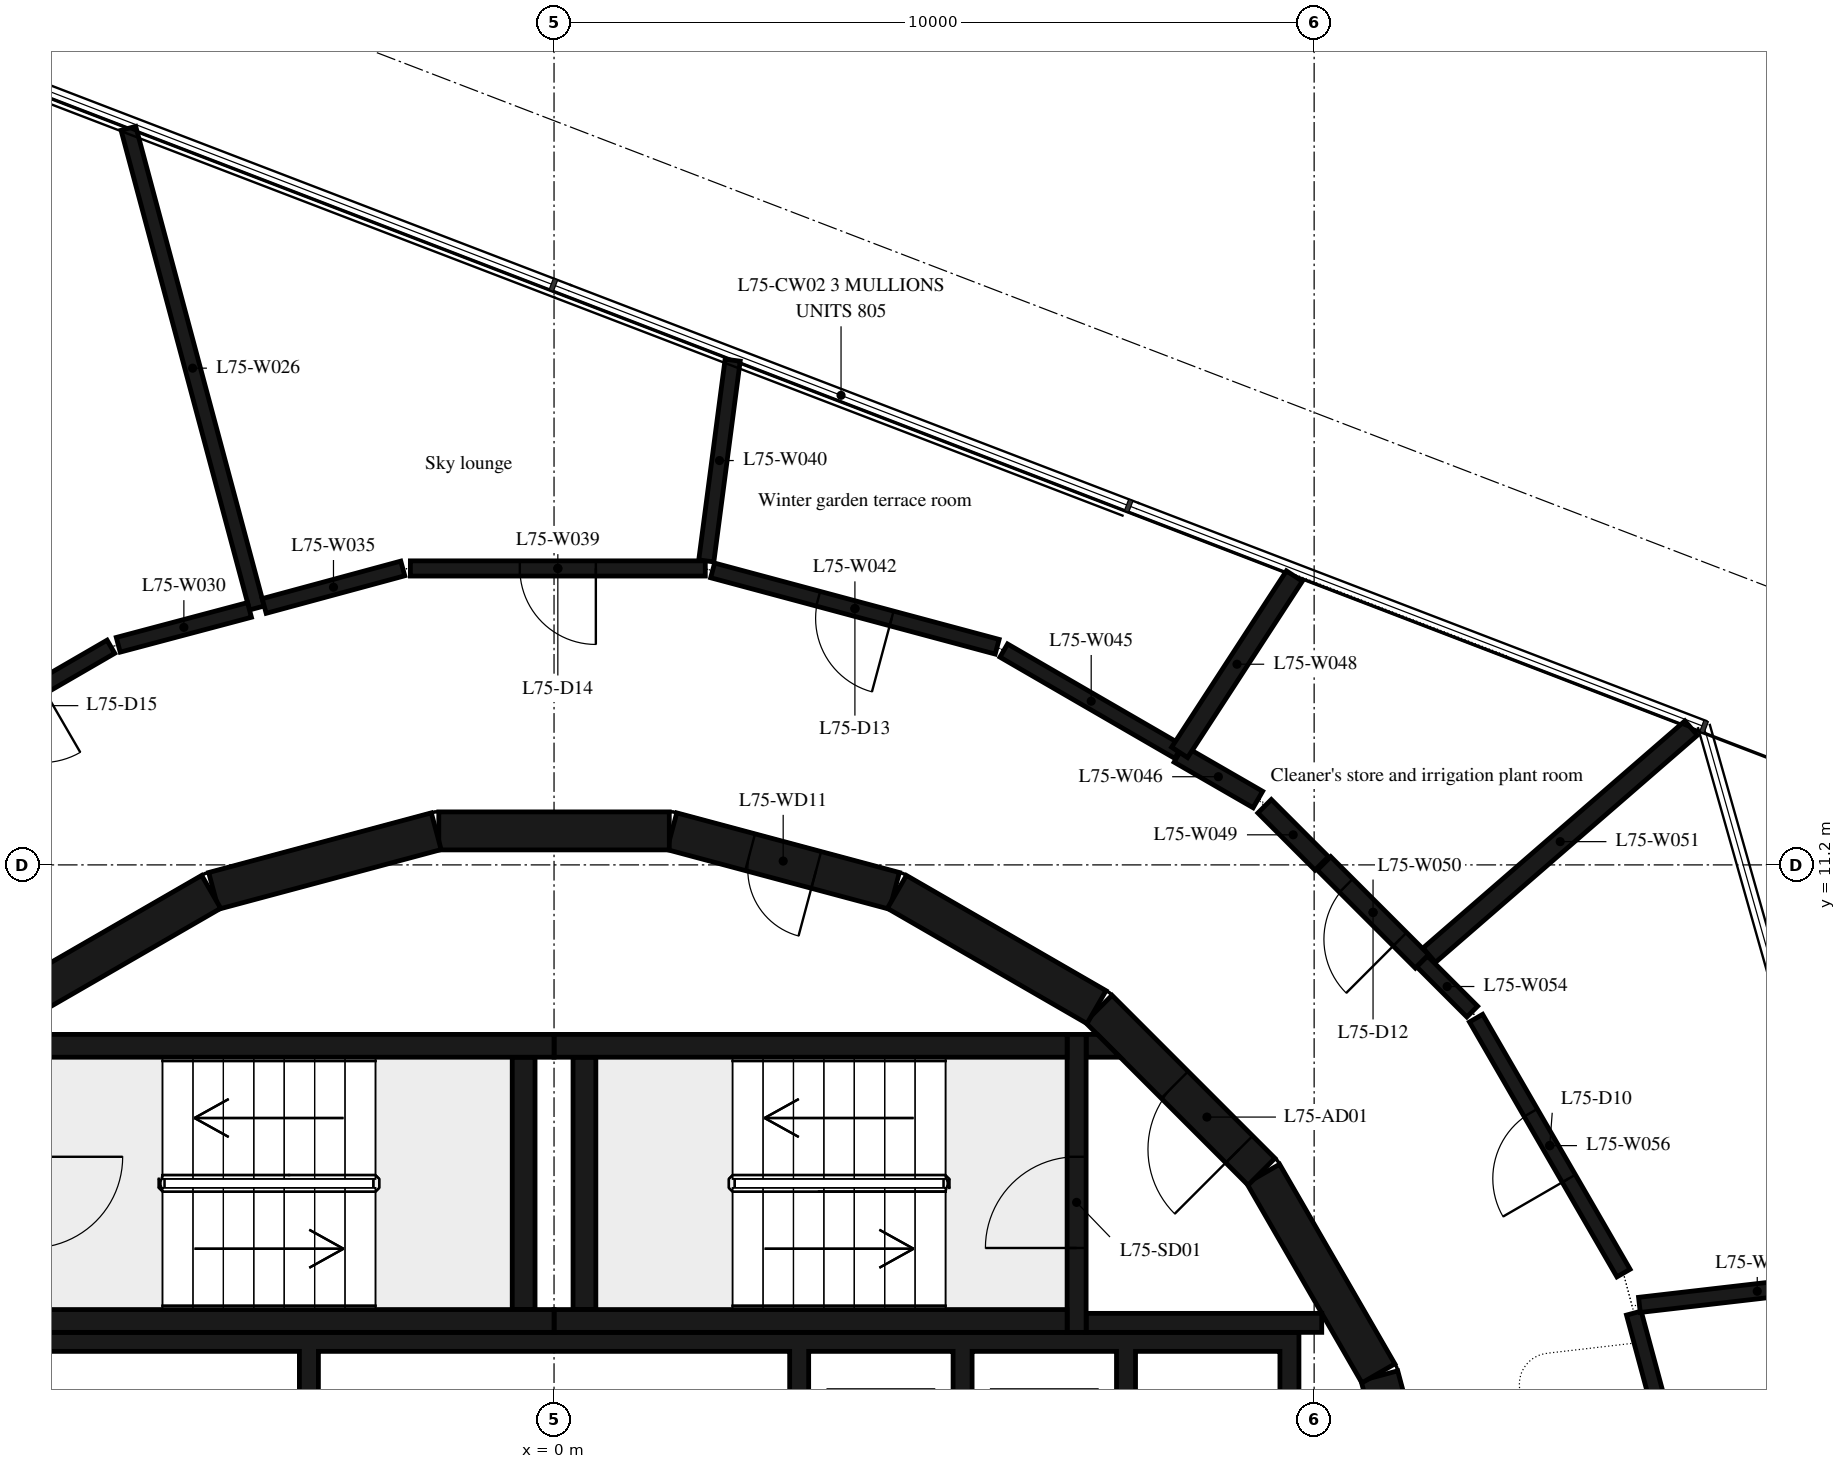
"""IFC4 building model, lengths in metres.
Left out: names, types, materials, properties, quantities, classifications, styles, units other than length and angle.
Written with IfcOpenShell. Run it as: python <this file> out.ifc"""

import sys

from ifc_helpers import new_model, si_unit, direction, frame, frame_2d, origin, place, context, subcontext, project, spatial, polyline, rectangle, outline, extrude, element, fill, save


model = new_model("IFC4")
c1 = context("Model", 3, precision=1e-05, world=origin(), true_north=direction((0.0, 1.0)))
c2 = subcontext(c1, "Body", "Model", "MODEL_VIEW")
j1 = project(units=[si_unit("LENGTHUNIT", "METRE"), si_unit("PLANEANGLEUNIT", "RADIAN")], contexts=[c1])
p1 = place(None, origin())
s1 = spatial("IfcSite", under=j1, at=p1, CompositionType="ELEMENT")
p2 = place(p1, origin())
s2 = spatial("IfcBuilding", under=s1, at=p2, CompositionType="ELEMENT")
p3 = place(p2, frame((0.0, 0.0, 291.4)))
s3 = spatial("IfcBuildingStorey", under=s2, at=p3, CompositionType="ELEMENT", Elevation=291.4)
for number, where, z_axis, x_axis in (
    (1, (11.643, 1.55, 0.0), (0.0, 0.0, 1.0), (-0.259, 0.966, 0.0)),
    (2, (10.845, 4.51, 0.0), (0.0, 0.0, 1.0), (-0.5, 0.866, 0.0)),
):
    element("IfcWall", number, at=place(p3, frame(where, z_axis=z_axis, x_axis=x_axis)), inside=s3, PredefinedType="SHEAR", context=c2, shape_type="SweptSolid", body=[
        extrude(rectangle(XDim=3.033, YDim=0.5, at=frame_2d((1.516, 0.0))), origin(), (0.0, 0.0, 1.0), 6.35),
    ])
p4 = place(p3, frame((9.308, 7.164, 0.0), z_axis=(0.0, 0.0, 1.0), x_axis=(-0.707106781187, 0.707106781187, 0.0)))
e3 = element("IfcWall", 3, at=p4, inside=s3, PredefinedType="SHEAR", context=c2, shape_type="SweptSolid", body=[
    extrude(rectangle(XDim=3.032, YDim=0.5, at=frame_2d((1.516, 0.0))), origin(), (0.0, 0.0, 1.0), 6.35),
])
p5 = place(p4, frame((0.416, 0.0, 0.0)))
e4 = element("IfcOpeningElement", 4, at=p5, cuts=e3, PredefinedType="OPENING", context=c2, shape_type="SweptSolid", body=[
    extrude(rectangle(XDim=1.2, YDim=2.1, at=frame_2d((0.6, 1.05))), frame((0.0, 0.26, 0.0), z_axis=(0.0, -1.0, 0.0), x_axis=(1.0, 0.0, 0.0)), (0.0, 0.0, 1.0), 0.52),
])
p6 = place(p3, frame((7.137, 9.329, 0.0), z_axis=(0.0, 0.0, 1.0), x_axis=(-0.865975092491, 0.500087131594, 0.0)))
e5 = element("IfcWall", 5, at=p6, inside=s3, PredefinedType="SHEAR", context=c2, shape_type="SweptSolid", body=[
    extrude(rectangle(XDim=3.033, YDim=0.5, at=frame_2d((1.516, 0.0))), origin(), (0.0, 0.0, 1.0), 6.35),
])
p7 = place(p3, frame((4.479, 10.858, 0.0), z_axis=(0.0, 0.0, 1.0), x_axis=(-0.965948410781, 0.258734743916, 0.0)))
e6 = element("IfcWall", 6, at=p7, inside=s3, PredefinedType="SHEAR", context=c2, shape_type="SweptSolid", body=[
    extrude(rectangle(XDim=3.033, YDim=0.5, at=frame_2d((1.516, 0.0))), origin(), (0.0, 0.0, 1.0), 6.35),
])
p8 = place(p7, frame((1.066, 0.0, 0.0)))
e7 = element("IfcOpeningElement", 7, at=p8, cuts=e6, PredefinedType="OPENING", context=c2, shape_type="SweptSolid", body=[
    extrude(rectangle(XDim=0.9, YDim=2.1, at=frame_2d((0.45, 1.05))), frame((0.0, 0.26, 0.0), z_axis=(0.0, -1.0, 0.0), x_axis=(1.0, 0.0, 0.0)), (0.0, 0.0, 1.0), 0.52),
])
for number, where, z_axis, x_axis in (
    (8, (1.516, 11.647, 0.0), (0.0, 0.0, 1.0), (-1.0, 0.0, 0.0)),
    (9, (-1.55, 11.643, 0.0), (0.0, 0.0, 1.0), (-0.966, -0.259, 0.0)),
    (10, (-4.51, 10.845, 0.0), (0.0, 0.0, 1.0), (-0.866, -0.5, 0.0)),
):
    element("IfcWall", number, at=place(p3, frame(where, z_axis=z_axis, x_axis=x_axis)), inside=s3, PredefinedType="SHEAR", context=c2, shape_type="SweptSolid", body=[
        extrude(rectangle(XDim=3.033, YDim=0.5, at=frame_2d((1.516, 0.0))), origin(), (0.0, 0.0, 1.0), 6.35),
    ])
for number, where, z_axis, x_axis in (
    (11, (0.0, 5.2, 0.0), (0.0, 0.0, 1.0), (1.0, 0.0, 0.0)),
    (12, (0.0, 8.82, 0.0), (0.0, 0.0, 1.0), (1.0, 0.0, 0.0)),
):
    element("IfcWall", number, at=place(p3, frame(where, z_axis=z_axis, x_axis=x_axis)), inside=s3, PredefinedType="SHEAR", context=c2, shape_type="SweptSolid", body=[
        extrude(rectangle(XDim=6.75, YDim=0.3, at=frame_2d((3.375, 0.0))), origin(), (0.0, 0.0, 1.0), 6.35),
    ])
p9 = place(p3, frame((0.4, 5.35, 0.0), z_axis=(0.0, 0.0, 1.0), x_axis=(0.0, 1.0, 0.0)))
e13 = element("IfcWall", 13, at=p9, inside=s3, PredefinedType="SHEAR", context=c2, shape_type="SweptSolid", body=[
    extrude(rectangle(XDim=3.32, YDim=0.3, at=frame_2d((1.66, 0.0))), origin(), (0.0, 0.0, 1.0), 6.35),
])
p10 = place(p3, frame((6.875, 5.05, 0.0), z_axis=(0.0, 0.0, 1.0), x_axis=(0.0, 1.0, 0.0)))
e14 = element("IfcWall", 14, at=p10, inside=s3, PredefinedType="SHEAR", context=c2, shape_type="SweptSolid", body=[
    extrude(rectangle(XDim=3.92, YDim=0.25, at=frame_2d((1.96, 0.0))), origin(), (0.0, 0.0, 1.0), 6.35),
])
p11 = place(p10, frame((1.11, 0.0, 0.0)))
e15 = element("IfcOpeningElement", 15, at=p11, cuts=e14, PredefinedType="OPENING", context=c2, shape_type="SweptSolid", body=[
    extrude(rectangle(XDim=1.2, YDim=2.1, at=frame_2d((0.6, 1.05))), frame((0.0, 0.135, 0.0), z_axis=(0.0, -1.0, 0.0), x_axis=(1.0, 0.0, 0.0)), (0.0, 0.0, 1.0), 0.27),
])
p12 = place(p3, frame((7.0, 5.175, 0.0), z_axis=(0.0, 0.0, 1.0), x_axis=(1.0, 0.0, 0.0)))
e16 = element("IfcWall", 16, at=p12, inside=s3, PredefinedType="SHEAR", context=c2, shape_type="SweptSolid", body=[
    extrude(rectangle(XDim=3.1, YDim=0.25, at=frame_2d((1.55, 0.0))), origin(), (0.0, 0.0, 1.0), 6.35),
])
p13 = place(p3, origin())
e17 = element("IfcWall", 17, at=p13, inside=s3, PredefinedType="SHEAR", context=c2, shape_type="SweptSolid", body=[
    extrude(outline(polyline([(7.448, 8.67), (7.0, 8.67), (7.0, 8.97), (7.148, 8.97), (7.448, 8.67)])), origin(), (0.0, 0.0, 1.0), 6.35),
])
for number, where, z_axis, x_axis in (
    (18, (-6.75, 5.2, 0.0), (0.0, 0.0, 1.0), (1.0, 0.0, 0.0)),
    (19, (-6.75, 8.82, 0.0), (0.0, 0.0, 1.0), (1.0, 0.0, 0.0)),
):
    element("IfcWall", number, at=place(p3, frame(where, z_axis=z_axis, x_axis=x_axis)), inside=s3, PredefinedType="SHEAR", context=c2, shape_type="SweptSolid", body=[
        extrude(rectangle(XDim=6.75, YDim=0.3, at=frame_2d((3.375, 0.0))), origin(), (0.0, 0.0, 1.0), 6.35),
    ])
p14 = place(p3, frame((-0.4, 5.35, 0.0), z_axis=(0.0, 0.0, 1.0), x_axis=(0.0, 1.0, 0.0)))
e20 = element("IfcWall", 20, at=p14, inside=s3, PredefinedType="SHEAR", context=c2, shape_type="SweptSolid", body=[
    extrude(rectangle(XDim=3.32, YDim=0.3, at=frame_2d((1.66, 0.0))), origin(), (0.0, 0.0, 1.0), 6.35),
])
p15 = place(p3, origin())
e21 = element("IfcWall", 21, at=p15, inside=s3, PredefinedType="SHEAR", context=c2, shape_type="SweptSolid", body=[
    extrude(outline(polyline([(-9.8, 1.9), (-9.55, 1.9), (-9.55, 4.8), (-3.35, 4.8), (-3.35, 1.9), (-3.1, 1.9), (-3.1, 4.8), (3.1, 4.8), (3.1, 1.9), (3.35, 1.9), (3.35, 4.8), (5.25, 4.8), (5.25, 1.9), (5.5, 1.9), (5.5, 4.8), (7.4, 4.8), (7.4, 1.9), (7.65, 1.9), (7.65, 4.8), (9.55, 4.8), (9.55, 1.9), (9.8, 1.9), (9.8, 4.8), (9.8, 5.05), (-9.8, 5.05), (-9.8, 4.8), (-9.8, 1.9)])), origin(), (0.0, 0.0, 1.0), 6.35),
])
p16 = place(p3, frame((-5.83, 14.07, 0.0), z_axis=(0.0, 0.0, 1.0), x_axis=(-0.865134039498, -0.501540719884, 0.0)))
e22 = element("IfcWall", 22, at=p16, inside=s3, PredefinedType="PARTITIONING", context=c2, shape_type="SweptSolid", body=[
    extrude(rectangle(XDim=3.09, YDim=0.2, at=frame_2d((1.545, 0.0))), origin(), (0.0, 0.0, 1.0), 6.35),
])
p17 = place(p16, frame((1.045, 0.0, 0.0)))
e23 = element("IfcOpeningElement", 23, at=p17, cuts=e22, PredefinedType="OPENING", context=c2, shape_type="SweptSolid", body=[
    extrude(rectangle(XDim=1.0, YDim=2.1, at=frame_2d((0.5, 1.05))), frame((0.0, 0.11, 0.0), z_axis=(0.0, -1.0, 0.0), x_axis=(1.0, 0.0, 0.0)), (0.0, 0.0, 1.0), 0.22),
])
p18 = place(p3, frame((-5.6, 20.89, 0.0), z_axis=(0.0, 0.0, 1.0), x_axis=(0.25874418063, -0.965945883055, 0.0)))
e24 = element("IfcWall", 24, at=p18, inside=s3, PredefinedType="PARTITIONING", context=c2, shape_type="SweptSolid", body=[
    extrude(rectangle(XDim=6.532, YDim=0.2, at=frame_2d((3.266, 0.0))), origin(), (0.0, 0.0, 1.0), 6.35),
])
p19 = place(p3, frame((-4.007, 14.554, 0.0), z_axis=(0.0, 0.0, 1.0), x_axis=(-0.966477180281, -0.256752526756, 0.0)))
e25 = element("IfcWall", 25, at=p19, inside=s3, PredefinedType="PARTITIONING", context=c2, shape_type="SweptSolid", body=[
    extrude(rectangle(XDim=1.787, YDim=0.2, at=frame_2d((0.893, 0.0))), origin(), (0.0, 0.0, 1.0), 6.35),
])
p20 = place(p3, frame((-1.99, 15.1, 0.0), z_axis=(0.0, 0.0, 1.0), x_axis=(-0.965221616417, -0.261433033875, 0.0)))
e26 = element("IfcWall", 26, at=p20, inside=s3, PredefinedType="PARTITIONING", context=c2, shape_type="SweptSolid", body=[
    extrude(rectangle(XDim=1.889, YDim=0.2, at=frame_2d((0.945, 0.0))), origin(), (0.0, 0.0, 1.0), 6.35),
])
p21 = place(p3, frame((1.99, 15.1, 0.0), z_axis=(0.0, 0.0, 1.0), x_axis=(-1.0, 0.0, 0.0)))
e27 = element("IfcWall", 27, at=p21, inside=s3, PredefinedType="PARTITIONING", context=c2, shape_type="SweptSolid", body=[
    extrude(rectangle(XDim=3.88, YDim=0.2, at=frame_2d((1.94, 0.0))), origin(), (0.0, 0.0, 1.0), 6.35),
])
p22 = place(p21, frame((1.44, 0.0, 0.0)))
e28 = element("IfcOpeningElement", 28, at=p22, cuts=e27, PredefinedType="OPENING", context=c2, shape_type="SweptSolid", body=[
    extrude(rectangle(XDim=1.0, YDim=2.1, at=frame_2d((0.5, 1.05))), frame((0.0, 0.11, 0.0), z_axis=(0.0, -1.0, 0.0), x_axis=(1.0, 0.0, 0.0)), (0.0, 0.0, 1.0), 0.22),
])
p23 = place(p3, frame((2.003, 15.199, 0.0), z_axis=(0.0, 0.0, 1.0), x_axis=(0.130338331924, 0.991469575545, 0.0)))
e29 = element("IfcWall", 29, at=p23, inside=s3, PredefinedType="PARTITIONING", context=c2, shape_type="SweptSolid", body=[
    extrude(rectangle(XDim=2.664, YDim=0.2, at=frame_2d((1.332, 0.0))), origin(), (0.0, 0.0, 1.0), 6.35),
])
p24 = place(p3, frame((5.83, 14.07, 0.0), z_axis=(0.0, 0.0, 1.0), x_axis=(-0.965870133458, 0.259026804199, 0.0)))
e30 = element("IfcWall", 30, at=p24, inside=s3, PredefinedType="PARTITIONING", context=c2, shape_type="SweptSolid", body=[
    extrude(rectangle(XDim=3.876, YDim=0.2, at=frame_2d((1.938, 0.0))), origin(), (0.0, 0.0, 1.0), 6.35),
])
p25 = place(p24, frame((1.438, 0.0, 0.0)))
e31 = element("IfcOpeningElement", 31, at=p25, cuts=e30, PredefinedType="OPENING", context=c2, shape_type="SweptSolid", body=[
    extrude(rectangle(XDim=1.0, YDim=2.1, at=frame_2d((0.5, 1.05))), frame((0.0, 0.11, 0.0), z_axis=(0.0, -1.0, 0.0), x_axis=(1.0, 0.0, 0.0)), (0.0, 0.0, 1.0), 0.22),
])
p26 = place(p3, frame((8.217, 12.687, 0.0), z_axis=(0.0, 0.0, 1.0), x_axis=(-0.865346643201, 0.501173809273, 0.0)))
e32 = element("IfcWall", 32, at=p26, inside=s3, PredefinedType="PARTITIONING", context=c2, shape_type="SweptSolid", body=[
    extrude(rectangle(XDim=2.659, YDim=0.2, at=frame_2d((1.329, 0.0))), origin(), (0.0, 0.0, 1.0), 6.35),
])
p27 = place(p3, frame((9.26, 12.06, 0.0), z_axis=(0.0, 0.0, 1.0), x_axis=(-0.866246515178, 0.499616828121, 0.0)))
e33 = element("IfcWall", 33, at=p27, inside=s3, PredefinedType="PARTITIONING", context=c2, shape_type="SweptSolid", body=[
    extrude(rectangle(XDim=1.201, YDim=0.25, at=frame_2d((0.6, 0.0))), origin(), (0.0, 0.0, 1.0), 6.35),
])
p28 = place(p3, frame((9.74, 15.0, 0.0), z_axis=(0.0, 0.0, 1.0), x_axis=(-0.545487355209, -0.838119051989, 0.0)))
e34 = element("IfcWall", 34, at=p28, inside=s3, PredefinedType="PARTITIONING", context=c2, shape_type="SweptSolid", body=[
    extrude(rectangle(XDim=2.768, YDim=0.25, at=frame_2d((1.384, 0.0))), origin(), (0.0, 0.0, 1.0), 6.35),
])
p29 = place(p3, frame((10.1, 11.22, 0.0), z_axis=(0.0, 0.0, 1.0), x_axis=(-0.707106781187, 0.707106781187, 0.0)))
e35 = element("IfcWall", 35, at=p29, inside=s3, PredefinedType="PARTITIONING", context=c2, shape_type="SweptSolid", body=[
    extrude(rectangle(XDim=1.063, YDim=0.25, at=frame_2d((0.531, 0.0))), origin(), (0.0, 0.0, 1.0), 6.35),
])
p30 = place(p3, frame((11.42, 9.93, 0.0), z_axis=(0.0, 0.0, 1.0), x_axis=(-0.707106781187, 0.707106781187, 0.0)))
e36 = element("IfcWall", 36, at=p30, inside=s3, PredefinedType="PARTITIONING", context=c2, shape_type="SweptSolid", body=[
    extrude(rectangle(XDim=1.824, YDim=0.25, at=frame_2d((0.912, 0.0))), origin(), (0.0, 0.0, 1.0), 6.35),
])
p31 = place(p30, frame((0.412, 0.0, 0.0)))
e37 = element("IfcOpeningElement", 37, at=p31, cuts=e36, PredefinedType="OPENING", context=c2, shape_type="SweptSolid", body=[
    extrude(rectangle(XDim=1.0, YDim=2.1, at=frame_2d((0.5, 1.05))), frame((0.0, 0.135, 0.0), z_axis=(0.0, -1.0, 0.0), x_axis=(1.0, 0.0, 0.0)), (0.0, 0.0, 1.0), 0.27),
])
p32 = place(p3, frame((11.514, 10.012, 0.0), z_axis=(0.0, 0.0, 1.0), x_axis=(0.755484160351, 0.655166912671, 0.0)))
e38 = element("IfcWall", 38, at=p32, inside=s3, PredefinedType="PARTITIONING", context=c2, shape_type="SweptSolid", body=[
    extrude(rectangle(XDim=4.561, YDim=0.25, at=frame_2d((2.28, 0.0))), origin(), (0.0, 0.0, 1.0), 6.35),
])
p33 = place(p3, frame((12.08, 9.27, 0.0), z_axis=(0.0, 0.0, 1.0), x_axis=(-0.707237545267, 0.70697599292, 0.0)))
e39 = element("IfcWall", 39, at=p33, inside=s3, PredefinedType="PARTITIONING", context=c2, shape_type="SweptSolid", body=[
    extrude(rectangle(XDim=0.933, YDim=0.2, at=frame_2d((0.467, 0.0))), origin(), (0.0, 0.0, 1.0), 6.35),
])
p34 = place(p3, frame((14.07, 5.83, 0.0), z_axis=(0.0, 0.0, 1.0), x_axis=(-0.500760497952, 0.865585884642, 0.0)))
e40 = element("IfcWall", 40, at=p34, inside=s3, PredefinedType="PARTITIONING", context=c2, shape_type="SweptSolid", body=[
    extrude(rectangle(XDim=3.874, YDim=0.2, at=frame_2d((1.937, 0.0))), origin(), (0.0, 0.0, 1.0), 6.35),
])
p35 = place(p34, frame((1.437, 0.0, 0.0)))
e41 = element("IfcOpeningElement", 41, at=p35, cuts=e40, PredefinedType="OPENING", context=c2, shape_type="SweptSolid", body=[
    extrude(rectangle(XDim=1.0, YDim=2.1, at=frame_2d((0.5, 1.05))), frame((0.0, 0.11, 0.0), z_axis=(0.0, -1.0, 0.0), x_axis=(1.0, 0.0, 0.0)), (0.0, 0.0, 1.0), 0.22),
])
p36 = place(p3, frame((15.1, 1.99, 0.0), z_axis=(0.0, 0.0, 1.0), x_axis=(-0.260504067916, 0.965472749796, 0.0)))
e42 = element("IfcWall", 42, at=p36, inside=s3, PredefinedType="PARTITIONING", context=c2, shape_type="SweptSolid", body=[
    extrude(rectangle(XDim=3.432, YDim=0.2, at=frame_2d((1.716, 0.0))), origin(), (0.0, 0.0, 1.0), 6.35),
])
p37 = place(p3, frame((17.38, 5.77, 0.0), z_axis=(0.0, 0.0, 1.0), x_axis=(-0.993376695714, -0.114903178426, 0.0)))
e43 = element("IfcWall", 43, at=p37, inside=s3, PredefinedType="PARTITIONING", context=c2, shape_type="SweptSolid", body=[
    extrude(rectangle(XDim=3.121, YDim=0.2, at=frame_2d((1.561, 0.0))), origin(), (0.0, 0.0, 1.0), 6.35),
])
p38 = place(p11, origin())
e44 = element("IfcDoor", 44, at=p38, inside=s3, OperationType="SINGLE_SWING_LEFT", PredefinedType="DOOR", context=c2, shape_type="SweptSolid", body=[
    extrude(rectangle(XDim=1.2, YDim=2.1, at=frame_2d((0.6, 1.05))), frame((0.0, 0.025, 0.0), z_axis=(0.0, -1.0, 0.0), x_axis=(1.0, 0.0, 0.0)), (0.0, 0.0, 1.0), 0.05),
])
fill(e15, e44)
p39 = place(p5, origin())
e45 = element("IfcDoor", 45, at=p39, inside=s3, OperationType="SINGLE_SWING_RIGHT", PredefinedType="DOOR", context=c2, shape_type="SweptSolid", body=[
    extrude(rectangle(XDim=1.2, YDim=2.1, at=frame_2d((0.6, 1.05))), frame((0.0, 0.025, 0.0), z_axis=(0.0, -1.0, 0.0), x_axis=(1.0, 0.0, 0.0)), (0.0, 0.0, 1.0), 0.05),
])
fill(e4, e45)
p40 = place(p8, origin())
e46 = element("IfcDoor", 46, at=p40, inside=s3, OperationType="SINGLE_SWING_LEFT", PredefinedType="DOOR", context=c2, shape_type="SweptSolid", body=[
    extrude(rectangle(XDim=0.9, YDim=2.1, at=frame_2d((0.45, 1.05))), frame((0.0, 0.025, 0.0), z_axis=(0.0, -1.0, 0.0), x_axis=(1.0, 0.0, 0.0)), (0.0, 0.0, 1.0), 0.05),
])
fill(e7, e46)
p41 = place(p35, origin())
e47 = element("IfcDoor", 47, at=p41, inside=s3, OperationType="SINGLE_SWING_LEFT", PredefinedType="DOOR", context=c2, shape_type="SweptSolid", body=[
    extrude(rectangle(XDim=1.0, YDim=2.1, at=frame_2d((0.5, 1.05))), frame((0.0, 0.025, 0.0), z_axis=(0.0, -1.0, 0.0), x_axis=(1.0, 0.0, 0.0)), (0.0, 0.0, 1.0), 0.05),
])
fill(e41, e47)
p42 = place(p31, origin())
e48 = element("IfcDoor", 48, at=p42, inside=s3, OperationType="SINGLE_SWING_LEFT", PredefinedType="DOOR", context=c2, shape_type="SweptSolid", body=[
    extrude(rectangle(XDim=1.0, YDim=2.1, at=frame_2d((0.5, 1.05))), frame((0.0, 0.025, 0.0), z_axis=(0.0, -1.0, 0.0), x_axis=(1.0, 0.0, 0.0)), (0.0, 0.0, 1.0), 0.05),
])
fill(e37, e48)
p43 = place(p25, origin())
e49 = element("IfcDoor", 49, at=p43, inside=s3, OperationType="SINGLE_SWING_LEFT", PredefinedType="DOOR", context=c2, shape_type="SweptSolid", body=[
    extrude(rectangle(XDim=1.0, YDim=2.1, at=frame_2d((0.5, 1.05))), frame((0.0, 0.025, 0.0), z_axis=(0.0, -1.0, 0.0), x_axis=(1.0, 0.0, 0.0)), (0.0, 0.0, 1.0), 0.05),
])
fill(e31, e49)
p44 = place(p22, origin())
e50 = element("IfcDoor", 50, at=p44, inside=s3, OperationType="SINGLE_SWING_LEFT", PredefinedType="DOOR", context=c2, shape_type="SweptSolid", body=[
    extrude(rectangle(XDim=1.0, YDim=2.1, at=frame_2d((0.5, 1.05))), frame((0.0, 0.025, 0.0), z_axis=(0.0, -1.0, 0.0), x_axis=(1.0, 0.0, 0.0)), (0.0, 0.0, 1.0), 0.05),
])
fill(e28, e50)
save(model, sys.argv[1])
